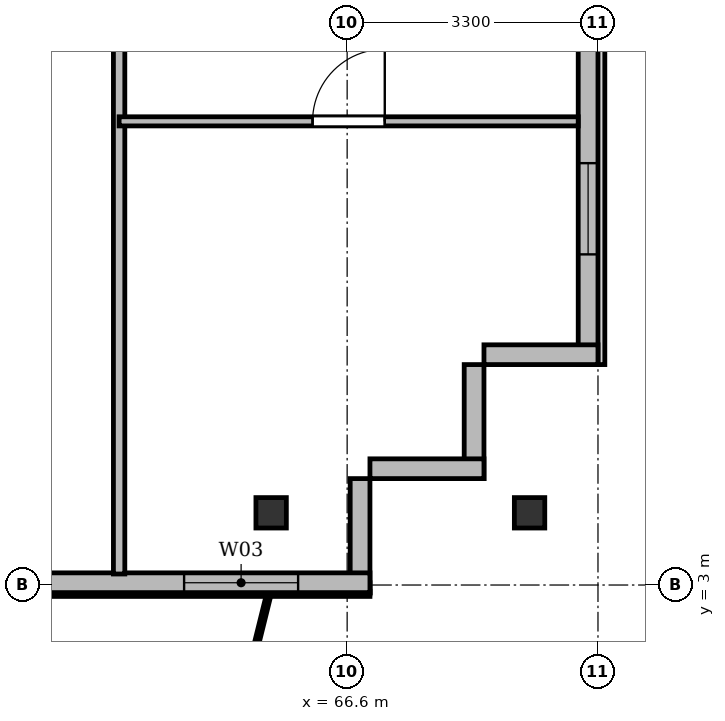
"""IFC4 building model, lengths in metres.
Left out: names, types, materials, properties, quantities, classifications, styles, units other than length and angle.
Written with IfcOpenShell. Run it as: python <this file> out.ifc"""

import sys

from ifc_helpers import new_model, si_unit, direction, frame, frame_2d, origin, origin_2d, place, context, subcontext, project, spatial, rectangle, i_section, extrude, source, transform, mapped, element, fill, save


model = new_model("IFC4")
c1 = context("Model", 3, precision=1e-05, world=origin(), true_north=direction((0.0, 1.0)))
c2 = subcontext(c1, "Body", "Model", "MODEL_VIEW")
j1 = project(units=[si_unit("LENGTHUNIT", "METRE"), si_unit("PLANEANGLEUNIT", "RADIAN")], contexts=[c1])
p1 = place(None, origin())
s1 = spatial("IfcSite", under=j1, at=p1, CompositionType="ELEMENT")
p2 = place(p1, origin())
s2 = spatial("IfcBuilding", under=s1, at=p2, CompositionType="ELEMENT")
p3 = place(p2, frame((0.0, 0.0, 88.9)))
s3 = spatial("IfcBuildingStorey", under=s2, at=p3, CompositionType="ELEMENT", Elevation=88.9)
m1 = source(origin(), c2, "Body", "SweptSolid", [
    extrude(i_section(OverallWidth=0.4, OverallDepth=0.4, WebThickness=0.022, FlangeThickness=0.035, at=origin_2d()), origin(), (0.0, 0.0, 1.0), 3.6),
])
for number, where, z_axis, x_axis in (
    (1, (65.6, 3.95, 0.0), (0.0, 0.0, 1.0), (1.0, 0.0, 0.0)),
    (2, (69.0, 3.95, 0.0), (0.0, 0.0, 1.0), (1.0, 0.0, 0.0)),
):
    element("IfcColumn", number, at=place(p3, frame(where, z_axis=z_axis, x_axis=x_axis)), inside=s3, PredefinedType="COLUMN", context=c2, shape_type="MappedRepresentation", body=[
        mapped(m1, transform((0.0, 0.0, 0.0), x_axis=(1.0, 0.0, 0.0), y_axis=(0.0, 1.0, 0.0), z_axis=(0.0, 0.0, 1.0), scale=1.0)),
    ])
p4 = place(p3, frame((69.77, 45.5, 0.0), z_axis=(0.0, 0.0, 1.0), x_axis=(0.0, -1.0, 0.0)))
e3 = element("IfcWall", 3, at=p4, inside=s3, PredefinedType="SOLIDWALL", context=c2, shape_type="SweptSolid", body=[
    extrude(rectangle(XDim=39.6, YDim=0.26, at=frame_2d((19.8, 0.0))), origin(), (0.0, 0.0, 1.0), 3.34),
])
p5 = place(p4, frame((36.95, 0.0, 0.92)))
e4 = element("IfcOpeningElement", 4, at=p5, cuts=e3, PredefinedType="OPENING", context=c2, shape_type="SweptSolid", body=[
    extrude(rectangle(XDim=1.2, YDim=1.65, at=frame_2d((0.6, 0.825))), frame((0.0, 0.14, 0.0), z_axis=(0.0, -1.0, 0.0), x_axis=(1.0, 0.0, 0.0)), (0.0, 0.0, 1.0), 0.28),
])
p6 = place(p4, frame((32.8, 0.0, 0.92)))
e5 = element("IfcOpeningElement", 5, at=p6, cuts=e3, PredefinedType="OPENING", context=c2, shape_type="SweptSolid", body=[
    extrude(rectangle(XDim=2.6, YDim=1.9, at=frame_2d((1.3, 0.95))), frame((0.0, 0.14, 0.0), z_axis=(0.0, -1.0, 0.0), x_axis=(1.0, 0.0, 0.0)), (0.0, 0.0, 1.0), 0.28),
])
p7 = place(p4, frame((28.6, 0.0, 0.92)))
e6 = element("IfcOpeningElement", 6, at=p7, cuts=e3, PredefinedType="OPENING", context=c2, shape_type="SweptSolid", body=[
    extrude(rectangle(XDim=2.6, YDim=1.9, at=frame_2d((1.3, 0.95))), frame((0.0, 0.14, 0.0), z_axis=(0.0, -1.0, 0.0), x_axis=(1.0, 0.0, 0.0)), (0.0, 0.0, 1.0), 0.28),
])
p8 = place(p4, frame((21.4, 0.0, 0.92)))
e7 = element("IfcOpeningElement", 7, at=p8, cuts=e3, PredefinedType="OPENING", context=c2, shape_type="SweptSolid", body=[
    extrude(rectangle(XDim=2.6, YDim=1.9, at=frame_2d((1.3, 0.95))), frame((0.0, 0.14, 0.0), z_axis=(0.0, -1.0, 0.0), x_axis=(1.0, 0.0, 0.0)), (0.0, 0.0, 1.0), 0.28),
])
p9 = place(p4, frame((7.4, 0.0, 0.92)))
e8 = element("IfcOpeningElement", 8, at=p9, cuts=e3, PredefinedType="OPENING", context=c2, shape_type="SweptSolid", body=[
    extrude(rectangle(XDim=2.6, YDim=1.9, at=frame_2d((1.3, 0.95))), frame((0.0, 0.14, 0.0), z_axis=(0.0, -1.0, 0.0), x_axis=(1.0, 0.0, 0.0)), (0.0, 0.0, 1.0), 0.28),
])
p10 = place(p4, frame((4.5, 0.0, 0.92)))
e9 = element("IfcOpeningElement", 9, at=p10, cuts=e3, PredefinedType="OPENING", context=c2, shape_type="SweptSolid", body=[
    extrude(rectangle(XDim=1.2, YDim=1.65, at=frame_2d((0.6, 0.825))), frame((0.0, 0.14, 0.0), z_axis=(0.0, -1.0, 0.0), x_axis=(1.0, 0.0, 0.0)), (0.0, 0.0, 1.0), 0.28),
])
p11 = place(p4, frame((1.15, 0.0, 0.92)))
e10 = element("IfcOpeningElement", 10, at=p11, cuts=e3, PredefinedType="OPENING", context=c2, shape_type="SweptSolid", body=[
    extrude(rectangle(XDim=1.2, YDim=1.65, at=frame_2d((0.6, 0.825))), frame((0.0, 0.14, 0.0), z_axis=(0.0, -1.0, 0.0), x_axis=(1.0, 0.0, 0.0)), (0.0, 0.0, 1.0), 0.28),
])
p12 = place(p3, frame((69.9, 6.03, 0.0), z_axis=(0.0, 0.0, 1.0), x_axis=(-1.0, 0.0, 0.0)))
e11 = element("IfcWall", 11, at=p12, inside=s3, PredefinedType="SOLIDWALL", context=c2, shape_type="SweptSolid", body=[
    extrude(rectangle(XDim=1.5, YDim=0.26, at=frame_2d((0.75, 0.0))), origin(), (0.0, 0.0, 1.0), 2.84),
])
for number, where, z_axis, x_axis in (
    (12, (68.27, 5.9, 0.0), (0.0, 0.0, 1.0), (0.0, -1.0, 0.0)),
    (13, (68.4, 4.53, 0.0), (0.0, 0.0, 1.0), (-1.0, 0.0, 0.0)),
):
    element("IfcWall", number, at=place(p3, frame(where, z_axis=z_axis, x_axis=x_axis)), inside=s3, PredefinedType="SOLIDWALL", context=c2, shape_type="SweptSolid", body=[
        extrude(rectangle(XDim=1.5, YDim=0.26, at=frame_2d((0.75, 0.0))), origin(), (0.0, 0.0, 1.0), 3.34),
    ])
p13 = place(p3, frame((66.77, 4.4, 0.0), z_axis=(0.0, 0.0, 1.0), x_axis=(0.0, -1.0, 0.0)))
e14 = element("IfcWall", 14, at=p13, inside=s3, PredefinedType="SOLIDWALL", context=c2, shape_type="SweptSolid", body=[
    extrude(rectangle(XDim=1.5, YDim=0.26, at=frame_2d((0.75, 0.0))), origin(), (0.0, 0.0, 1.0), 2.752),
])
p14 = place(p3, frame((66.9, 3.03, 0.0), z_axis=(0.0, 0.0, 1.0), x_axis=(-1.0, 0.0, 0.0)))
e15 = element("IfcWall", 15, at=p14, inside=s3, PredefinedType="SOLIDWALL", context=c2, shape_type="SweptSolid", body=[
    extrude(rectangle(XDim=59.4, YDim=0.26, at=frame_2d((29.7, 0.0))), origin(), (0.0, 0.0, 1.0), 3.34),
])
p15 = place(p14, frame((0.945, 0.0, 0.9)))
e16 = element("IfcOpeningElement", 16, at=p15, cuts=e15, PredefinedType="OPENING", context=c2, shape_type="SweptSolid", body=[
    extrude(rectangle(XDim=1.5, YDim=1.75, at=frame_2d((0.75, 0.875))), frame((0.0, 0.14, 0.0), z_axis=(0.0, -1.0, 0.0), x_axis=(1.0, 0.0, 0.0)), (0.0, 0.0, 1.0), 0.28),
])
p16 = place(p14, frame((4.7, 0.0, 0.9)))
e17 = element("IfcOpeningElement", 17, at=p16, cuts=e15, PredefinedType="OPENING", context=c2, shape_type="SweptSolid", body=[
    extrude(rectangle(XDim=2.0, YDim=1.95, at=frame_2d((1.0, 0.975))), frame((0.0, 0.14, 0.0), z_axis=(0.0, -1.0, 0.0), x_axis=(1.0, 0.0, 0.0)), (0.0, 0.0, 1.0), 0.28),
])
p17 = place(p14, frame((9.18, 0.0, 0.0)))
e18 = element("IfcOpeningElement", 18, at=p17, cuts=e15, PredefinedType="OPENING", context=c2, shape_type="SweptSolid", body=[
    extrude(rectangle(XDim=1.2, YDim=2.2, at=frame_2d((0.6, 1.1))), frame((0.0, 0.14, 0.0), z_axis=(0.0, -1.0, 0.0), x_axis=(1.0, 0.0, 0.0)), (0.0, 0.0, 1.0), 0.28),
])
p18 = place(p14, frame((13.05, 0.0, 0.9)))
e19 = element("IfcOpeningElement", 19, at=p18, cuts=e15, PredefinedType="OPENING", context=c2, shape_type="SweptSolid", body=[
    extrude(rectangle(XDim=1.8, YDim=1.8, at=frame_2d((0.9, 0.9))), frame((0.0, 0.14, 0.0), z_axis=(0.0, -1.0, 0.0), x_axis=(1.0, 0.0, 0.0)), (0.0, 0.0, 1.0), 0.28),
])
p19 = place(p14, frame((16.35, 0.0, 0.9)))
e20 = element("IfcOpeningElement", 20, at=p19, cuts=e15, PredefinedType="OPENING", context=c2, shape_type="SweptSolid", body=[
    extrude(rectangle(XDim=1.5, YDim=1.75, at=frame_2d((0.75, 0.875))), frame((0.0, 0.14, 0.0), z_axis=(0.0, -1.0, 0.0), x_axis=(1.0, 0.0, 0.0)), (0.0, 0.0, 1.0), 0.28),
])
p20 = place(p14, frame((18.75, 0.0, 0.9)))
e21 = element("IfcOpeningElement", 21, at=p20, cuts=e15, PredefinedType="OPENING", context=c2, shape_type="SweptSolid", body=[
    extrude(rectangle(XDim=1.5, YDim=1.75, at=frame_2d((0.75, 0.875))), frame((0.0, 0.14, 0.0), z_axis=(0.0, -1.0, 0.0), x_axis=(1.0, 0.0, 0.0)), (0.0, 0.0, 1.0), 0.28),
])
p21 = place(p14, frame((20.9, 0.0, 0.9)))
e22 = element("IfcOpeningElement", 22, at=p21, cuts=e15, PredefinedType="OPENING", context=c2, shape_type="SweptSolid", body=[
    extrude(rectangle(XDim=2.0, YDim=1.95, at=frame_2d((1.0, 0.975))), frame((0.0, 0.14, 0.0), z_axis=(0.0, -1.0, 0.0), x_axis=(1.0, 0.0, 0.0)), (0.0, 0.0, 1.0), 0.28),
])
p22 = place(p14, frame((24.025, 0.0, 0.9)))
e23 = element("IfcOpeningElement", 23, at=p22, cuts=e15, PredefinedType="OPENING", context=c2, shape_type="SweptSolid", body=[
    extrude(rectangle(XDim=1.65, YDim=1.85, at=frame_2d((0.825, 0.925))), frame((0.0, 0.14, 0.0), z_axis=(0.0, -1.0, 0.0), x_axis=(1.0, 0.0, 0.0)), (0.0, 0.0, 1.0), 0.28),
])
p23 = place(p14, frame((27.45, 0.0, 0.9)))
e24 = element("IfcOpeningElement", 24, at=p23, cuts=e15, PredefinedType="OPENING", context=c2, shape_type="SweptSolid", body=[
    extrude(rectangle(XDim=1.8, YDim=1.8, at=frame_2d((0.9, 0.9))), frame((0.0, 0.14, 0.0), z_axis=(0.0, -1.0, 0.0), x_axis=(1.0, 0.0, 0.0)), (0.0, 0.0, 1.0), 0.28),
])
p24 = place(p14, frame((32.1, 0.0, 0.9)))
e25 = element("IfcOpeningElement", 25, at=p24, cuts=e15, PredefinedType="OPENING", context=c2, shape_type="SweptSolid", body=[
    extrude(rectangle(XDim=2.2, YDim=1.8, at=frame_2d((1.1, 0.9))), frame((0.0, 0.14, 0.0), z_axis=(0.0, -1.0, 0.0), x_axis=(1.0, 0.0, 0.0)), (0.0, 0.0, 1.0), 0.28),
])
p25 = place(p14, frame((40.301, 0.0, 0.0)))
e26 = element("IfcOpeningElement", 26, at=p25, cuts=e15, PredefinedType="OPENING", context=c2, shape_type="SweptSolid", body=[
    extrude(rectangle(XDim=1.2, YDim=2.2, at=frame_2d((0.6, 1.1))), frame((0.0, 0.14, 0.0), z_axis=(0.0, -1.0, 0.0), x_axis=(1.0, 0.0, 0.0)), (0.0, 0.0, 1.0), 0.28),
])
p26 = place(p14, frame((46.4, 0.0, 0.9)))
e27 = element("IfcOpeningElement", 27, at=p26, cuts=e15, PredefinedType="OPENING", context=c2, shape_type="SweptSolid", body=[
    extrude(rectangle(XDim=2.0, YDim=1.95, at=frame_2d((1.0, 0.975))), frame((0.0, 0.14, 0.0), z_axis=(0.0, -1.0, 0.0), x_axis=(1.0, 0.0, 0.0)), (0.0, 0.0, 1.0), 0.28),
])
p27 = place(p14, frame((54.558, 0.0, 0.0)))
e28 = element("IfcOpeningElement", 28, at=p27, cuts=e15, PredefinedType="OPENING", context=c2, shape_type="SweptSolid", body=[
    extrude(rectangle(XDim=1.2, YDim=2.2, at=frame_2d((0.6, 1.1))), frame((0.0, 0.14, 0.0), z_axis=(0.0, -1.0, 0.0), x_axis=(1.0, 0.0, 0.0)), (0.0, 0.0, 1.0), 0.28),
])
p28 = place(p14, frame((56.905, 0.0, 0.9)))
e29 = element("IfcOpeningElement", 29, at=p28, cuts=e15, PredefinedType="OPENING", context=c2, shape_type="SweptSolid", body=[
    extrude(rectangle(XDim=1.8, YDim=1.8, at=frame_2d((0.9, 0.9))), frame((0.0, 0.14, 0.0), z_axis=(0.0, -1.0, 0.0), x_axis=(1.0, 0.0, 0.0)), (0.0, 0.0, 1.0), 0.28),
])
p29 = place(p3, frame((63.6, 3.145, 0.0), z_axis=(0.0, 0.0, 1.0), x_axis=(0.0, 1.0, 0.0)))
e30 = element("IfcWall", 30, at=p29, inside=s3, PredefinedType="PARTITIONING", context=c2, shape_type="SweptSolid", body=[
    extrude(rectangle(XDim=24.455, YDim=0.15, at=frame_2d((12.228, 0.0))), origin(), (0.0, 0.0, 1.0), 2.752),
])
p30 = place(p3, frame((63.6, 9.1, 0.0), z_axis=(0.0, 0.0, 1.0), x_axis=(1.0, 0.0, 0.0)))
e31 = element("IfcWall", 31, at=p30, inside=s3, PredefinedType="PARTITIONING", context=c2, shape_type="SweptSolid", body=[
    extrude(rectangle(XDim=6.04, YDim=0.12, at=frame_2d((3.02, 0.0))), origin(), (0.0, 0.0, 1.0), 2.84),
])
p31 = place(p30, frame((2.545, 0.0, 0.0)))
e32 = element("IfcOpeningElement", 32, at=p31, cuts=e31, PredefinedType="OPENING", context=c2, shape_type="SweptSolid", body=[
    extrude(rectangle(XDim=0.95, YDim=2.15, at=frame_2d((0.475, 1.075))), frame((0.0, 0.07, 0.0), z_axis=(0.0, -1.0, 0.0), x_axis=(1.0, 0.0, 0.0)), (0.0, 0.0, 1.0), 0.14),
])
m2 = source(origin(), c2, "Body", "SweptSolid", [
    extrude(rectangle(XDim=1.2, YDim=1.65, at=frame_2d((0.6, 0.825))), frame((0.0, 0.03, 0.0), z_axis=(0.0, -1.0, 0.0), x_axis=(1.0, 0.0, 0.0)), (0.0, 0.0, 1.0), 0.06),
])
p32 = place(p5, origin())
e33 = element("IfcWindow", 33, at=p32, inside=s3, PartitioningType="SINGLE_PANEL", PredefinedType="WINDOW", context=c2, shape_type="MappedRepresentation", body=[
    mapped(m2, transform((0.0, 0.0, 0.0), x_axis=(1.0, 0.0, 0.0), y_axis=(0.0, 1.0, 0.0), z_axis=(0.0, 0.0, 1.0), scale=1.0)),
])
fill(e4, e33)
m3 = source(origin(), c2, "Body", "SweptSolid", [
    extrude(rectangle(XDim=1.5, YDim=1.75, at=frame_2d((0.75, 0.875))), frame((0.0, 0.03, 0.0), z_axis=(0.0, -1.0, 0.0), x_axis=(1.0, 0.0, 0.0)), (0.0, 0.0, 1.0), 0.06),
])
p33 = place(p15, origin())
e34 = element("IfcWindow", 34, at=p33, inside=s3, PartitioningType="SINGLE_PANEL", PredefinedType="WINDOW", context=c2, shape_type="MappedRepresentation", body=[
    mapped(m3, transform((0.0, 0.0, 0.0), x_axis=(1.0, 0.0, 0.0), y_axis=(0.0, 1.0, 0.0), z_axis=(0.0, 0.0, 1.0), scale=1.0)),
])
fill(e16, e34)
m4 = source(origin(), c2, "Body", "SweptSolid", [
    extrude(rectangle(XDim=0.95, YDim=2.15, at=frame_2d((0.475, 1.075))), frame((0.0, 0.025, 0.0), z_axis=(0.0, -1.0, 0.0), x_axis=(1.0, 0.0, 0.0)), (0.0, 0.0, 1.0), 0.05),
])
p34 = place(p31, origin())
e35 = element("IfcDoor", 35, at=p34, inside=s3, OperationType="SINGLE_SWING_RIGHT", PredefinedType="DOOR", context=c2, shape_type="MappedRepresentation", body=[
    mapped(m4, transform((0.0, 0.0, 0.0), x_axis=(1.0, 0.0, 0.0), y_axis=(0.0, 1.0, 0.0), z_axis=(0.0, 0.0, 1.0), scale=1.0)),
])
fill(e32, e35)
save(model, sys.argv[1])
